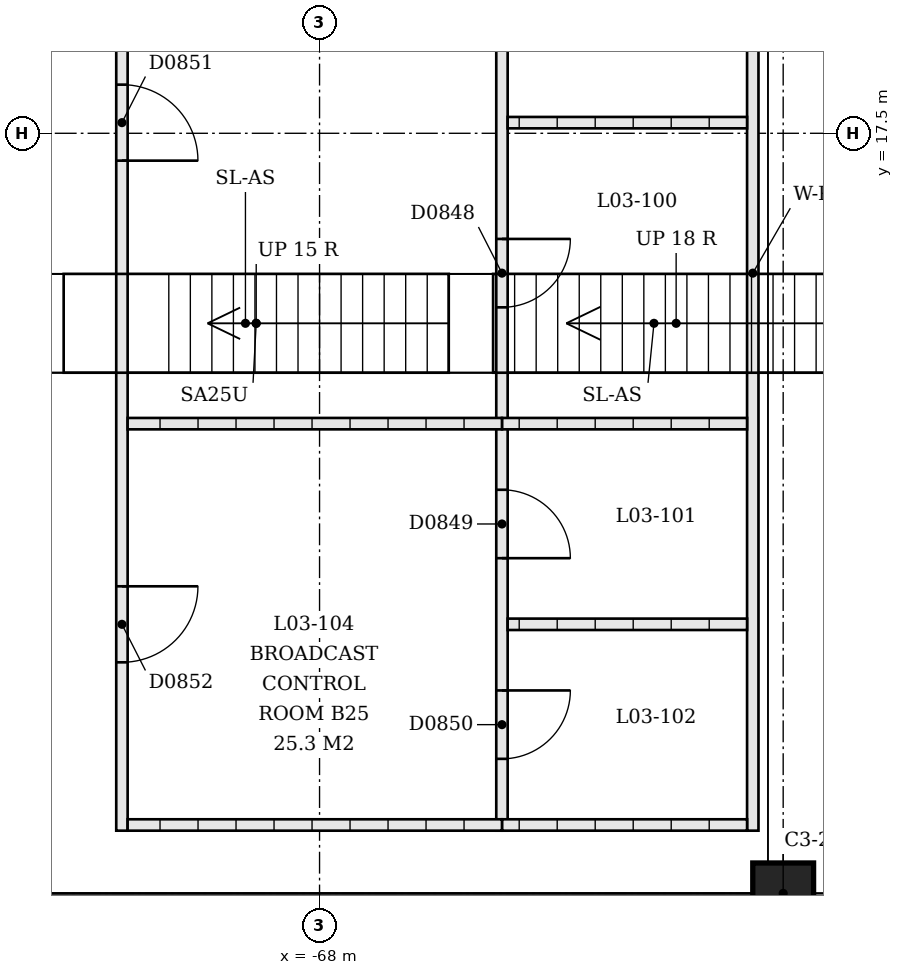
"""IFC4 building model, lengths in metres.
Left out: names, types, materials, properties, quantities, classifications, styles, units other than length and angle.
Written with IfcOpenShell. Run it as: python <this file> out.ifc"""

import sys

from ifc_helpers import new_model, si_unit, direction, frame, frame_2d, origin, origin_2d, place, context, subcontext, project, spatial, rectangle, extrude, element, fill, save


model = new_model("IFC4")
c1 = context("Model", 3, precision=1e-05, world=origin(), true_north=direction((0.0, 1.0)))
c2 = subcontext(c1, "Body", "Model", "MODEL_VIEW")
j1 = project(units=[si_unit("LENGTHUNIT", "METRE"), si_unit("PLANEANGLEUNIT", "RADIAN")], contexts=[c1])
p1 = place(None, origin())
s1 = spatial("IfcSite", under=j1, at=p1, CompositionType="ELEMENT")
p2 = place(p1, origin())
s2 = spatial("IfcBuilding", under=s1, at=p2, CompositionType="ELEMENT")
p3 = place(p2, frame((0.0, 0.0, 13.5)))
s3 = spatial("IfcBuildingStorey", under=s2, at=p3, CompositionType="ELEMENT", Elevation=13.5)
p4 = place(p3, frame((-61.9, 7.5, 0.0), z_axis=(0.0, 0.0, 1.0), x_axis=(0.0, -1.0, 0.0)))
e1 = element("IfcColumn", 1, at=p4, inside=s3, PredefinedType="COLUMN", context=c2, shape_type="SweptSolid", body=[
    extrude(rectangle(XDim=0.8, YDim=0.8, at=origin_2d()), origin(), (0.0, 0.0, 1.0), 2.033),
])
p5 = place(p3, frame((-62.3, 22.0, 0.0), z_axis=(0.0, 0.0, 1.0), x_axis=(0.0, -1.0, 0.0)))
e2 = element("IfcWall", 2, at=p5, inside=s3, PredefinedType="PARTITIONING", context=c2, shape_type="SweptSolid", body=[
    extrude(rectangle(XDim=13.675, YDim=0.15, at=frame_2d((6.837, 0.0))), origin(), (0.0, 0.0, 1.0), 3.0),
])
p6 = place(p3, frame((-65.6, 21.675, 0.0), z_axis=(0.0, 0.0, 1.0), x_axis=(0.0, -1.0, 0.0)))
e3 = element("IfcWall", 3, at=p6, inside=s3, PredefinedType="PARTITIONING", context=c2, shape_type="SweptSolid", body=[
    extrude(rectangle(XDim=13.35, YDim=0.15, at=frame_2d((6.675, 0.0))), origin(), (0.0, 0.0, 1.0), 3.0),
])
p7 = place(p6, frame((1.605, 0.0, 0.0)))
e4 = element("IfcOpeningElement", 4, at=p7, cuts=e3, PredefinedType="OPENING", context=c2, shape_type="SweptSolid", body=[
    extrude(rectangle(XDim=0.9, YDim=2.1, at=frame_2d((0.45, 1.05))), frame((0.0, 0.075, 0.0), z_axis=(0.0, -1.0, 0.0), x_axis=(1.0, 0.0, 0.0)), (0.0, 0.0, 1.0), 0.15),
])
p8 = place(p6, frame((5.565, 0.0, 0.0)))
e5 = element("IfcOpeningElement", 5, at=p8, cuts=e3, PredefinedType="OPENING", context=c2, shape_type="SweptSolid", body=[
    extrude(rectangle(XDim=0.9, YDim=2.1, at=frame_2d((0.45, 1.05))), frame((0.0, 0.075, 0.0), z_axis=(0.0, -1.0, 0.0), x_axis=(1.0, 0.0, 0.0)), (0.0, 0.0, 1.0), 0.15),
])
p9 = place(p6, frame((8.865, 0.0, 0.0)))
e6 = element("IfcOpeningElement", 6, at=p9, cuts=e3, PredefinedType="OPENING", context=c2, shape_type="SweptSolid", body=[
    extrude(rectangle(XDim=0.9, YDim=2.1, at=frame_2d((0.45, 1.05))), frame((0.0, 0.075, 0.0), z_axis=(0.0, -1.0, 0.0), x_axis=(1.0, 0.0, 0.0)), (0.0, 0.0, 1.0), 0.15),
])
p10 = place(p6, frame((11.505, 0.0, 0.0)))
e7 = element("IfcOpeningElement", 7, at=p10, cuts=e3, PredefinedType="OPENING", context=c2, shape_type="SweptSolid", body=[
    extrude(rectangle(XDim=0.9, YDim=2.1, at=frame_2d((0.45, 1.05))), frame((0.0, 0.075, 0.0), z_axis=(0.0, -1.0, 0.0), x_axis=(1.0, 0.0, 0.0)), (0.0, 0.0, 1.0), 0.15),
])
p11 = place(p3, frame((-62.375, 17.64, 0.0), z_axis=(0.0, 0.0, 1.0), x_axis=(-1.0, 0.0, 0.0)))
e8 = element("IfcWall", 8, at=p11, inside=s3, PredefinedType="PARTITIONING", context=c2, shape_type="SweptSolid", body=[
    extrude(rectangle(XDim=3.15, YDim=0.15, at=frame_2d((1.575, 0.0))), origin(), (0.0, 0.0, 1.0), 3.0),
])
p12 = place(p3, frame((-62.375, 13.68, 0.0), z_axis=(0.0, 0.0, 1.0), x_axis=(-1.0, 0.0, 0.0)))
e9 = element("IfcWall", 9, at=p12, inside=s3, PredefinedType="PARTITIONING", context=c2, shape_type="SweptSolid", body=[
    extrude(rectangle(XDim=3.225, YDim=0.15, at=frame_2d((1.613, 0.0))), origin(), (0.0, 0.0, 1.0), 3.0),
])
p13 = place(p3, frame((-62.375, 11.04, 0.0), z_axis=(0.0, 0.0, 1.0), x_axis=(-1.0, 0.0, 0.0)))
e10 = element("IfcWall", 10, at=p13, inside=s3, PredefinedType="PARTITIONING", context=c2, shape_type="SweptSolid", body=[
    extrude(rectangle(XDim=3.15, YDim=0.15, at=frame_2d((1.575, 0.0))), origin(), (0.0, 0.0, 1.0), 3.0),
])
p14 = place(p3, frame((-62.375, 8.4, 0.0), z_axis=(0.0, 0.0, 1.0), x_axis=(-1.0, 0.0, 0.0)))
e11 = element("IfcWall", 11, at=p14, inside=s3, PredefinedType="PARTITIONING", context=c2, shape_type="SweptSolid", body=[
    extrude(rectangle(XDim=3.225, YDim=0.15, at=frame_2d((1.613, 0.0))), origin(), (0.0, 0.0, 1.0), 3.0),
])
p15 = place(p3, frame((-70.6, 21.675, 0.0), z_axis=(0.0, 0.0, 1.0), x_axis=(0.0, -1.0, 0.0)))
e12 = element("IfcWall", 12, at=p15, inside=s3, PredefinedType="PARTITIONING", context=c2, shape_type="SweptSolid", body=[
    extrude(rectangle(XDim=13.35, YDim=0.15, at=frame_2d((6.675, 0.0))), origin(), (0.0, 0.0, 1.0), 3.0),
])
p16 = place(p15, frame((3.535, 0.0, 0.0)))
e13 = element("IfcOpeningElement", 13, at=p16, cuts=e12, PredefinedType="OPENING", context=c2, shape_type="SweptSolid", body=[
    extrude(rectangle(XDim=1.0, YDim=2.1, at=frame_2d((0.5, 1.05))), frame((0.0, 0.075, 0.0), z_axis=(0.0, -1.0, 0.0), x_axis=(1.0, 0.0, 0.0)), (0.0, 0.0, 1.0), 0.15),
])
p17 = place(p15, frame((10.135, 0.0, 0.0)))
e14 = element("IfcOpeningElement", 14, at=p17, cuts=e12, PredefinedType="OPENING", context=c2, shape_type="SweptSolid", body=[
    extrude(rectangle(XDim=1.0, YDim=2.1, at=frame_2d((0.5, 1.05))), frame((0.0, 0.075, 0.0), z_axis=(0.0, -1.0, 0.0), x_axis=(1.0, 0.0, 0.0)), (0.0, 0.0, 1.0), 0.15),
])
for number, where, z_axis, x_axis in (
    (15, (-65.6, 13.68, 0.0), (0.0, 0.0, 1.0), (-1.0, 0.0, 0.0)),
    (16, (-65.6, 8.4, 0.0), (0.0, 0.0, 1.0), (-1.0, 0.0, 0.0)),
):
    element("IfcWall", number, at=place(p3, frame(where, z_axis=z_axis, x_axis=x_axis)), inside=s3, PredefinedType="PARTITIONING", context=c2, shape_type="SweptSolid", body=[
        extrude(rectangle(XDim=4.925, YDim=0.15, at=frame_2d((2.462, 0.0))), origin(), (0.0, 0.0, 1.0), 3.0),
    ])
p18 = place(p8, origin())
e17 = element("IfcDoor", 17, at=p18, inside=s3, OperationType="SINGLE_SWING_RIGHT", PredefinedType="DOOR", context=c2, shape_type="SweptSolid", body=[
    extrude(rectangle(XDim=0.9, YDim=2.1, at=frame_2d((0.45, 1.05))), frame((0.0, 0.025, 0.0), z_axis=(0.0, -1.0, 0.0), x_axis=(1.0, 0.0, 0.0)), (0.0, 0.0, 1.0), 0.05),
])
fill(e5, e17)
p19 = place(p9, origin())
e18 = element("IfcDoor", 18, at=p19, inside=s3, OperationType="SINGLE_SWING_LEFT", PredefinedType="DOOR", context=c2, shape_type="SweptSolid", body=[
    extrude(rectangle(XDim=0.9, YDim=2.1, at=frame_2d((0.45, 1.05))), frame((0.0, 0.025, 0.0), z_axis=(0.0, -1.0, 0.0), x_axis=(1.0, 0.0, 0.0)), (0.0, 0.0, 1.0), 0.05),
])
fill(e6, e18)
p20 = place(p10, origin())
e19 = element("IfcDoor", 19, at=p20, inside=s3, OperationType="SINGLE_SWING_RIGHT", PredefinedType="DOOR", context=c2, shape_type="SweptSolid", body=[
    extrude(rectangle(XDim=0.9, YDim=2.1, at=frame_2d((0.45, 1.05))), frame((0.0, 0.025, 0.0), z_axis=(0.0, -1.0, 0.0), x_axis=(1.0, 0.0, 0.0)), (0.0, 0.0, 1.0), 0.05),
])
fill(e7, e19)
p21 = place(p16, origin())
e20 = element("IfcDoor", 20, at=p21, inside=s3, OperationType="SINGLE_SWING_LEFT", PredefinedType="DOOR", context=c2, shape_type="SweptSolid", body=[
    extrude(rectangle(XDim=1.0, YDim=2.1, at=frame_2d((0.5, 1.05))), frame((0.0, 0.025, 0.0), z_axis=(0.0, -1.0, 0.0), x_axis=(1.0, 0.0, 0.0)), (0.0, 0.0, 1.0), 0.05),
])
fill(e13, e20)
p22 = place(p17, origin())
e21 = element("IfcDoor", 21, at=p22, inside=s3, OperationType="SINGLE_SWING_RIGHT", PredefinedType="DOOR", context=c2, shape_type="SweptSolid", body=[
    extrude(rectangle(XDim=1.0, YDim=2.1, at=frame_2d((0.5, 1.05))), frame((0.0, 0.025, 0.0), z_axis=(0.0, -1.0, 0.0), x_axis=(1.0, 0.0, 0.0)), (0.0, 0.0, 1.0), 0.05),
])
fill(e14, e21)
save(model, sys.argv[1])
